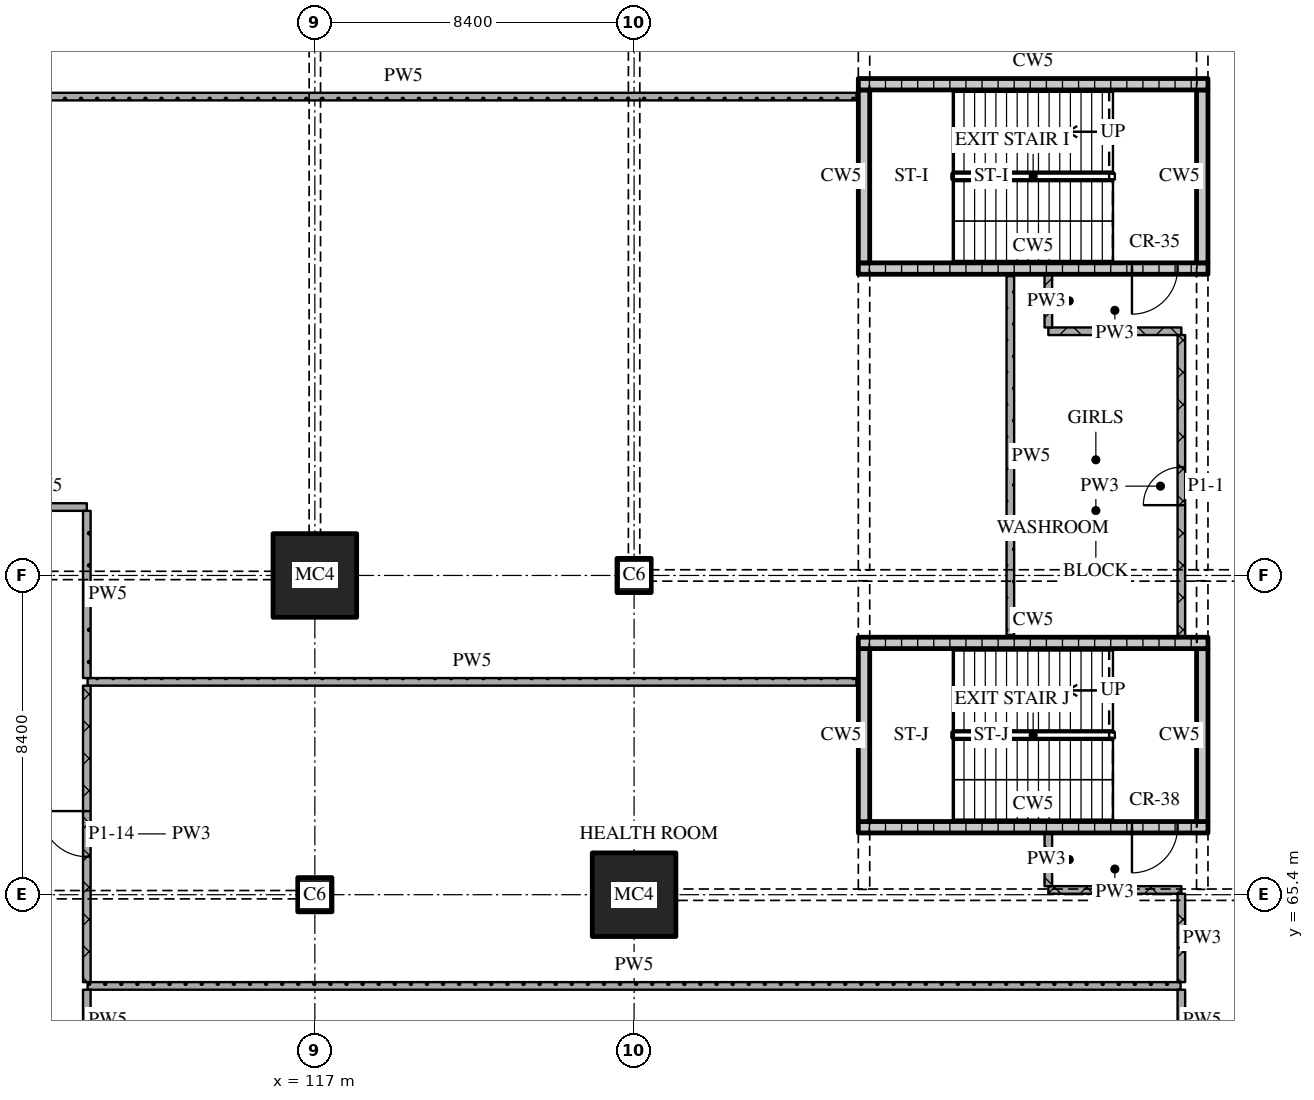
"""IFC4 building model, lengths in metres.
Left out: names, types, materials, properties, quantities, classifications, styles, units other than length and angle.
Written with IfcOpenShell. Run it as: python <this file> out.ifc"""

import sys

from ifc_helpers import new_model, si_unit, direction, frame, frame_2d, origin, origin_2d, place, context, subcontext, project, spatial, rectangle, extrude, element, fill, save


model = new_model("IFC4")
c1 = context("Model", 3, precision=1e-05, world=origin(), true_north=direction((0.0, 1.0)))
c2 = subcontext(c1, "Body", "Model", "MODEL_VIEW")
j1 = project(units=[si_unit("LENGTHUNIT", "METRE"), si_unit("PLANEANGLEUNIT", "RADIAN")], contexts=[c1])
p1 = place(None, origin())
s1 = spatial("IfcSite", under=j1, at=p1, CompositionType="ELEMENT")
p2 = place(p1, origin())
s2 = spatial("IfcBuilding", under=s1, at=p2, CompositionType="ELEMENT")
p3 = place(p2, frame((0.0, 0.0, 9.0)))
s3 = spatial("IfcBuildingStorey", under=s2, at=p3, CompositionType="ELEMENT", Elevation=9.0)
p4 = place(p3, frame((117.0, 65.4, 0.0), z_axis=(0.0, 0.0, 1.0), x_axis=(1.0, 0.0, 0.0)))
e1 = element("IfcColumn", 1, at=p4, inside=s3, PredefinedType="COLUMN", context=c2, shape_type="SweptSolid", body=[
    extrude(rectangle(XDim=0.9, YDim=0.9, at=origin_2d()), origin(), (0.0, 0.0, 1.0), 5.4),
])
for number, where, z_axis, x_axis in (
    (2, (117.0, 73.8, 0.0), (0.0, 0.0, 1.0), (1.0, 0.0, 0.0)),
    (3, (125.4, 65.4, 0.0), (0.0, 0.0, 1.0), (1.0, 0.0, 0.0)),
):
    element("IfcColumn", number, at=place(p3, frame(where, z_axis=z_axis, x_axis=x_axis)), inside=s3, PredefinedType="COLUMN", context=c2, shape_type="SweptSolid", body=[
        extrude(rectangle(XDim=2.2, YDim=2.2, at=origin_2d()), origin(), (0.0, 0.0, 1.0), 5.4),
    ])
p5 = place(p3, frame((125.4, 73.8, 0.0), z_axis=(0.0, 0.0, 1.0), x_axis=(1.0, 0.0, 0.0)))
e4 = element("IfcColumn", 4, at=p5, inside=s3, PredefinedType="COLUMN", context=c2, shape_type="SweptSolid", body=[
    extrude(rectangle(XDim=0.9, YDim=0.9, at=origin_2d()), origin(), (0.0, 0.0, 1.0), 5.4),
])
p6 = place(p3, frame((131.3, 81.875, 0.0), z_axis=(0.0, 0.0, 1.0), x_axis=(1.0, 0.0, 0.0)))
e5 = element("IfcWall", 5, at=p6, inside=s3, PredefinedType="SOLIDWALL", context=c2, shape_type="SweptSolid", body=[
    extrude(rectangle(XDim=9.2, YDim=0.3, at=frame_2d((4.6, 0.0))), origin(), (0.0, 0.0, 1.0), 5.1),
])
p7 = place(p6, frame((7.2, 0.0, 0.0)))
e6 = element("IfcOpeningElement", 6, at=p7, cuts=e5, PredefinedType="OPENING", context=c2, shape_type="SweptSolid", body=[
    extrude(rectangle(XDim=1.2, YDim=2.1, at=frame_2d((0.6, 1.05))), frame((0.0, 0.16, 0.0), z_axis=(0.0, -1.0, 0.0), x_axis=(1.0, 0.0, 0.0)), (0.0, 0.0, 1.0), 0.32),
])
for number, where, z_axis, x_axis in (
    (7, (131.45, 82.025, 0.0), (0.0, 0.0, 1.0), (0.0, 1.0, 0.0)),
    (8, (140.35, 82.025, 0.0), (0.0, 0.0, 1.0), (0.0, 1.0, 0.0)),
):
    element("IfcWall", number, at=place(p3, frame(where, z_axis=z_axis, x_axis=x_axis)), inside=s3, PredefinedType="SOLIDWALL", context=c2, shape_type="SweptSolid", body=[
        extrude(rectangle(XDim=4.55, YDim=0.3, at=frame_2d((2.275, 0.0))), origin(), (0.0, 0.0, 1.0), 5.1),
    ])
p8 = place(p3, frame((131.3, 86.725, 0.0), z_axis=(0.0, 0.0, 1.0), x_axis=(1.0, 0.0, 0.0)))
e9 = element("IfcWall", 9, at=p8, inside=s3, PredefinedType="SOLIDWALL", context=c2, shape_type="SweptSolid", body=[
    extrude(rectangle(XDim=9.2, YDim=0.3, at=frame_2d((4.6, 0.0))), origin(), (0.0, 0.0, 1.0), 5.1),
])
p9 = place(p3, frame((131.3, 67.175, 0.0), z_axis=(0.0, 0.0, 1.0), x_axis=(1.0, 0.0, 0.0)))
e10 = element("IfcWall", 10, at=p9, inside=s3, PredefinedType="SOLIDWALL", context=c2, shape_type="SweptSolid", body=[
    extrude(rectangle(XDim=9.2, YDim=0.3, at=frame_2d((4.6, 0.0))), origin(), (0.0, 0.0, 1.0), 5.1),
])
p10 = place(p9, frame((7.2, 0.0, 0.0)))
e11 = element("IfcOpeningElement", 11, at=p10, cuts=e10, PredefinedType="OPENING", context=c2, shape_type="SweptSolid", body=[
    extrude(rectangle(XDim=1.2, YDim=2.1, at=frame_2d((0.6, 1.05))), frame((0.0, 0.16, 0.0), z_axis=(0.0, -1.0, 0.0), x_axis=(1.0, 0.0, 0.0)), (0.0, 0.0, 1.0), 0.32),
])
for number, where, z_axis, x_axis in (
    (12, (131.45, 67.325, 0.0), (0.0, 0.0, 1.0), (0.0, 1.0, 0.0)),
    (13, (140.35, 67.325, 0.0), (0.0, 0.0, 1.0), (0.0, 1.0, 0.0)),
):
    element("IfcWall", number, at=place(p3, frame(where, z_axis=z_axis, x_axis=x_axis)), inside=s3, PredefinedType="SOLIDWALL", context=c2, shape_type="SweptSolid", body=[
        extrude(rectangle(XDim=4.55, YDim=0.3, at=frame_2d((2.275, 0.0))), origin(), (0.0, 0.0, 1.0), 5.1),
    ])
p11 = place(p3, frame((131.3, 72.025, 0.0), z_axis=(0.0, 0.0, 1.0), x_axis=(1.0, 0.0, 0.0)))
e14 = element("IfcWall", 14, at=p11, inside=s3, PredefinedType="SOLIDWALL", context=c2, shape_type="SweptSolid", body=[
    extrude(rectangle(XDim=9.2, YDim=0.3, at=frame_2d((4.6, 0.0))), origin(), (0.0, 0.0, 1.0), 5.1),
])
p12 = place(p3, frame((111.02, 63.0, 0.0), z_axis=(0.0, 0.0, 1.0), x_axis=(1.0, 0.0, 0.0)))
e15 = element("IfcWall", 15, at=p12, inside=s3, PredefinedType="PARTITIONING", context=c2, shape_type="SweptSolid", body=[
    extrude(rectangle(XDim=28.76, YDim=0.2, at=frame_2d((14.38, 0.0))), origin(), (0.0, 0.0, 1.0), 5.1),
])
p13 = place(p3, frame((136.3, 65.525, 0.0), z_axis=(0.0, 0.0, 1.0), x_axis=(1.0, 0.0, 0.0)))
e16 = element("IfcWall", 16, at=p13, inside=s3, PredefinedType="PARTITIONING", context=c2, shape_type="SweptSolid", body=[
    extrude(rectangle(XDim=3.5, YDim=0.2, at=frame_2d((1.75, 0.0))), origin(), (0.0, 0.0, 1.0), 4.11),
])
p14 = place(p3, frame((111.02, 71.0, 0.0), z_axis=(0.0, 0.0, 1.0), x_axis=(1.0, 0.0, 0.0)))
e17 = element("IfcWall", 17, at=p14, inside=s3, PredefinedType="PARTITIONING", context=c2, shape_type="SweptSolid", body=[
    extrude(rectangle(XDim=20.23, YDim=0.2, at=frame_2d((10.115, 0.0))), origin(), (0.0, 0.0, 1.0), 5.1),
])
p15 = place(p3, frame((108.7, 75.6, 0.0), z_axis=(0.0, 0.0, 1.0), x_axis=(1.0, 0.0, 0.0)))
e18 = element("IfcWall", 18, at=p15, inside=s3, PredefinedType="PARTITIONING", context=c2, shape_type="SweptSolid", body=[
    extrude(rectangle(XDim=2.3, YDim=0.2, at=frame_2d((1.15, 0.0))), origin(), (0.0, 0.0, 1.0), 5.1),
])
p16 = place(p3, frame((136.3, 80.225, 0.0), z_axis=(0.0, 0.0, 1.0), x_axis=(1.0, 0.0, 0.0)))
e19 = element("IfcWall", 19, at=p16, inside=s3, PredefinedType="PARTITIONING", context=c2, shape_type="SweptSolid", body=[
    extrude(rectangle(XDim=3.5, YDim=0.2, at=frame_2d((1.75, 0.0))), origin(), (0.0, 0.0, 1.0), 5.1),
])
p17 = place(p3, frame((107.42, 86.4, 0.0), z_axis=(0.0, 0.0, 1.0), x_axis=(1.0, 0.0, 0.0)))
e20 = element("IfcWall", 20, at=p17, inside=s3, PredefinedType="PARTITIONING", context=c2, shape_type="SweptSolid", body=[
    extrude(rectangle(XDim=23.83, YDim=0.2, at=frame_2d((11.915, 0.0))), origin(), (0.0, 0.0, 1.0), 5.1),
])
p18 = place(p3, frame((111.0, 70.9, 0.0), z_axis=(0.0, 0.0, 1.0), x_axis=(0.0, -1.0, 0.0)))
e21 = element("IfcWall", 21, at=p18, inside=s3, PredefinedType="PARTITIONING", context=c2, shape_type="SweptSolid", body=[
    extrude(rectangle(XDim=7.8, YDim=0.2, at=frame_2d((3.9, 0.0))), origin(), (0.0, 0.0, 1.0), 5.1),
])
p19 = place(p18, frame((3.3, 0.0, 0.0)))
e22 = element("IfcOpeningElement", 22, at=p19, cuts=e21, PredefinedType="OPENING", context=c2, shape_type="SweptSolid", body=[
    extrude(rectangle(XDim=1.2, YDim=2.1, at=frame_2d((0.6, 1.05))), frame((0.0, 0.11, 0.0), z_axis=(0.0, -1.0, 0.0), x_axis=(1.0, 0.0, 0.0)), (0.0, 0.0, 1.0), 0.22),
])
p20 = place(p3, frame((111.0, 62.9, 0.0), z_axis=(0.0, 0.0, 1.0), x_axis=(0.0, -1.0, 0.0)))
e23 = element("IfcWall", 23, at=p20, inside=s3, PredefinedType="PARTITIONING", context=c2, shape_type="SweptSolid", body=[
    extrude(rectangle(XDim=1.6, YDim=0.2, at=frame_2d((0.8, 0.0))), origin(), (0.0, 0.0, 1.0), 5.1),
])
p21 = place(p3, frame((111.0, 75.5, 0.0), z_axis=(0.0, 0.0, 1.0), x_axis=(0.0, -1.0, 0.0)))
e24 = element("IfcWall", 24, at=p21, inside=s3, PredefinedType="PARTITIONING", context=c2, shape_type="SweptSolid", body=[
    extrude(rectangle(XDim=4.4, YDim=0.2, at=frame_2d((2.2, 0.0))), origin(), (0.0, 0.0, 1.0), 5.1),
])
p22 = place(p3, frame((135.3, 81.675, 0.0), z_axis=(0.0, 0.0, 1.0), x_axis=(0.0, -1.0, 0.0)))
e25 = element("IfcWall", 25, at=p22, inside=s3, PredefinedType="PARTITIONING", context=c2, shape_type="SweptSolid", body=[
    extrude(rectangle(XDim=9.45, YDim=0.2, at=frame_2d((4.725, 0.0))), origin(), (0.0, 0.0, 1.0), 5.1),
])
p23 = place(p3, frame((136.3, 67.025, 0.0), z_axis=(0.0, 0.0, 1.0), x_axis=(0.0, -1.0, 0.0)))
e26 = element("IfcWall", 26, at=p23, inside=s3, PredefinedType="PARTITIONING", context=c2, shape_type="SweptSolid", body=[
    extrude(rectangle(XDim=1.4, YDim=0.2, at=frame_2d((0.7, 0.0))), origin(), (0.0, 0.0, 1.0), 5.1),
])
p24 = place(p3, frame((136.3, 81.725, 0.0), z_axis=(0.0, 0.0, 1.0), x_axis=(0.0, -1.0, 0.0)))
e27 = element("IfcWall", 27, at=p24, inside=s3, PredefinedType="PARTITIONING", context=c2, shape_type="SweptSolid", body=[
    extrude(rectangle(XDim=1.4, YDim=0.2, at=frame_2d((0.7, 0.0))), origin(), (0.0, 0.0, 1.0), 5.1),
])
p25 = place(p3, frame((139.8, 65.425, 0.0), z_axis=(0.0, 0.0, 1.0), x_axis=(0.0, -1.0, 0.0)))
e28 = element("IfcWall", 28, at=p25, inside=s3, PredefinedType="PARTITIONING", context=c2, shape_type="SweptSolid", body=[
    extrude(rectangle(XDim=2.325, YDim=0.2, at=frame_2d((1.163, 0.0))), origin(), (0.0, 0.0, 1.0), 5.1),
])
p26 = place(p3, frame((139.8, 72.175, 0.0), z_axis=(0.0, 0.0, 1.0), x_axis=(0.0, 1.0, 0.0)))
e29 = element("IfcWall", 29, at=p26, inside=s3, PredefinedType="PARTITIONING", context=c2, shape_type="SweptSolid", body=[
    extrude(rectangle(XDim=7.95, YDim=0.2, at=frame_2d((3.975, 0.0))), origin(), (0.0, 0.0, 1.0), 5.1),
])
p27 = place(p26, frame((3.475, 0.0, 0.0)))
e30 = element("IfcOpeningElement", 30, at=p27, cuts=e29, PredefinedType="OPENING", context=c2, shape_type="SweptSolid", body=[
    extrude(rectangle(XDim=1.0, YDim=2.1, at=frame_2d((0.5, 1.05))), frame((0.0, 0.11, 0.0), z_axis=(0.0, -1.0, 0.0), x_axis=(1.0, 0.0, 0.0)), (0.0, 0.0, 1.0), 0.22),
])
p28 = place(p3, frame((139.8, 62.9, 0.0), z_axis=(0.0, 0.0, 1.0), x_axis=(0.0, -1.0, 0.0)))
e31 = element("IfcWall", 31, at=p28, inside=s3, PredefinedType="PARTITIONING", context=c2, shape_type="SweptSolid", body=[
    extrude(rectangle(XDim=1.6, YDim=0.2, at=frame_2d((0.8, 0.0))), origin(), (0.0, 0.0, 1.0), 5.1),
])
p29 = place(p7, origin())
e32 = element("IfcDoor", 32, at=p29, inside=s3, OperationType="SINGLE_SWING_RIGHT", PredefinedType="DOOR", context=c2, shape_type="SweptSolid", body=[
    extrude(rectangle(XDim=1.2, YDim=2.1, at=frame_2d((0.6, 1.05))), frame((0.0, 0.025, 0.0), z_axis=(0.0, -1.0, 0.0), x_axis=(1.0, 0.0, 0.0)), (0.0, 0.0, 1.0), 0.05),
])
fill(e6, e32)
p30 = place(p10, origin())
e33 = element("IfcDoor", 33, at=p30, inside=s3, OperationType="SINGLE_SWING_RIGHT", PredefinedType="DOOR", context=c2, shape_type="SweptSolid", body=[
    extrude(rectangle(XDim=1.2, YDim=2.1, at=frame_2d((0.6, 1.05))), frame((0.0, 0.025, 0.0), z_axis=(0.0, -1.0, 0.0), x_axis=(1.0, 0.0, 0.0)), (0.0, 0.0, 1.0), 0.05),
])
fill(e11, e33)
p31 = place(p19, origin())
e34 = element("IfcDoor", 34, at=p31, inside=s3, OperationType="SINGLE_SWING_RIGHT", PredefinedType="DOOR", context=c2, shape_type="SweptSolid", body=[
    extrude(rectangle(XDim=1.2, YDim=2.1, at=frame_2d((0.6, 1.05))), frame((0.0, 0.025, 0.0), z_axis=(0.0, -1.0, 0.0), x_axis=(1.0, 0.0, 0.0)), (0.0, 0.0, 1.0), 0.05),
])
fill(e22, e34)
p32 = place(p27, origin())
e35 = element("IfcDoor", 35, at=p32, inside=s3, OperationType="SINGLE_SWING_LEFT", PredefinedType="DOOR", context=c2, shape_type="SweptSolid", body=[
    extrude(rectangle(XDim=1.0, YDim=2.1, at=frame_2d((0.5, 1.05))), frame((0.0, 0.025, 0.0), z_axis=(0.0, -1.0, 0.0), x_axis=(1.0, 0.0, 0.0)), (0.0, 0.0, 1.0), 0.05),
])
fill(e30, e35)
save(model, sys.argv[1])
